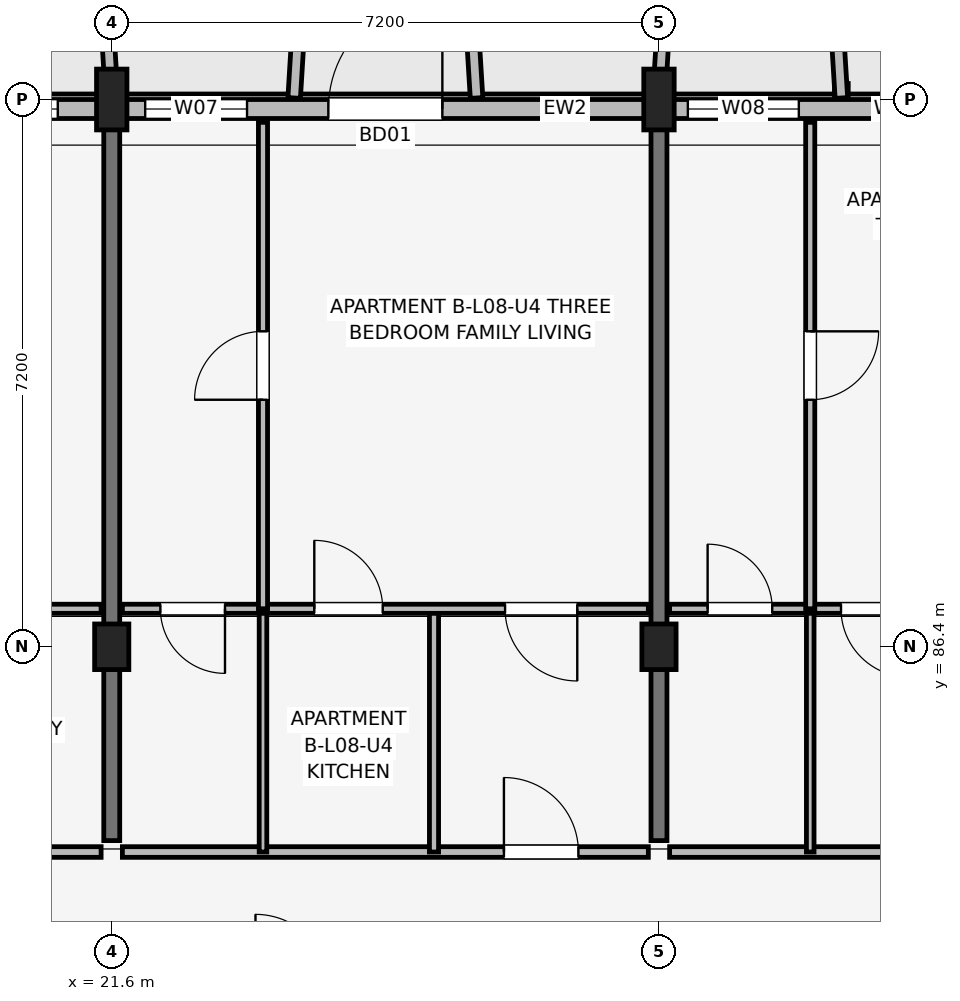
"""IFC4 building model, lengths in metres.
Left out: names, types, materials, properties, quantities, classifications, styles, units other than length and angle.
Written with IfcOpenShell. Run it as: python <this file> out.ifc"""

import sys

from ifc_helpers import new_model, si_unit, direction, frame, frame_2d, origin, origin_2d, place, context, subcontext, project, spatial, rectangle, extrude, element, fill, save


model = new_model("IFC4")
c1 = context("Model", 3, precision=1e-05, world=origin(), true_north=direction((0.0, 1.0)))
c2 = subcontext(c1, "Body", "Model", "MODEL_VIEW")
j1 = project(units=[si_unit("LENGTHUNIT", "METRE"), si_unit("PLANEANGLEUNIT", "RADIAN")], contexts=[c1])
p1 = place(None, origin())
s1 = spatial("IfcSite", under=j1, at=p1, CompositionType="ELEMENT")
p2 = place(p1, origin())
s2 = spatial("IfcBuilding", under=s1, at=p2, CompositionType="ELEMENT")
p3 = place(p2, frame((0.0, 0.0, 27.6)))
s3 = spatial("IfcBuildingStorey", under=s2, at=p3, CompositionType="ELEMENT", Elevation=27.6)
p4 = place(p3, frame((21.6, 86.4, 0.0), z_axis=(0.0, 0.0, 1.0), x_axis=(1.0, 0.0, 0.0)))
e1 = element("IfcColumn", 1, at=p4, inside=s3, PredefinedType="COLUMN", context=c2, shape_type="SweptSolid", body=[
    extrude(rectangle(XDim=0.45, YDim=0.6, at=origin_2d()), origin(), (0.0, 0.0, 1.0), 3.15),
])
p5 = place(p3, frame((21.6, 93.6, 0.0), z_axis=(0.0, 0.0, 1.0), x_axis=(1.0, 0.0, 0.0)))
e2 = element("IfcColumn", 2, at=p5, inside=s3, PredefinedType="COLUMN", context=c2, shape_type="SweptSolid", body=[
    extrude(rectangle(XDim=0.4, YDim=0.8, at=origin_2d()), origin(), (0.0, 0.0, 1.0), 3.15),
])
p6 = place(p3, frame((28.8, 86.4, 0.0), z_axis=(0.0, 0.0, 1.0), x_axis=(1.0, 0.0, 0.0)))
e3 = element("IfcColumn", 3, at=p6, inside=s3, PredefinedType="COLUMN", context=c2, shape_type="SweptSolid", body=[
    extrude(rectangle(XDim=0.45, YDim=0.6, at=origin_2d()), origin(), (0.0, 0.0, 1.0), 3.15),
])
p7 = place(p3, frame((28.8, 93.6, 0.0), z_axis=(0.0, 0.0, 1.0), x_axis=(1.0, 0.0, 0.0)))
e4 = element("IfcColumn", 4, at=p7, inside=s3, PredefinedType="COLUMN", context=c2, shape_type="SweptSolid", body=[
    extrude(rectangle(XDim=0.4, YDim=0.8, at=origin_2d()), origin(), (0.0, 0.0, 1.0), 3.15),
])
for number, where, z_axis, x_axis in (
    (5, (21.6, 83.85, 0.0), (0.0, 0.0, 1.0), (0.0, 1.0, 0.0)),
    (6, (28.8, 83.85, 0.0), (0.0, 0.0, 1.0), (0.0, 1.0, 0.0)),
):
    element("IfcWall", number, at=place(p3, frame(where, z_axis=z_axis, x_axis=x_axis)), inside=s3, PredefinedType="SHEAR", context=c2, shape_type="SweptSolid", body=[
        extrude(rectangle(XDim=9.4, YDim=0.21, at=frame_2d((4.7, 0.0))), origin(), (0.0, 0.0, 1.0), 3.15),
    ])
p8 = place(p3, frame((32.8, 93.475, 0.0), z_axis=(0.0, 0.0, 1.0), x_axis=(-1.0, 0.0, 0.0)))
e7 = element("IfcWall", 7, at=p8, inside=s3, PredefinedType="SOLIDWALL", context=c2, shape_type="SweptSolid", body=[
    extrude(rectangle(XDim=29.6, YDim=0.25, at=frame_2d((14.8, 0.0))), origin(), (0.0, 0.0, 1.0), 2.43),
])
p9 = place(p8, frame((22.825, 0.0, 0.0), z_axis=(0.0, 0.0, 1.0), x_axis=(-1.0, 0.0, 0.0)))
e8 = element("IfcOpeningElement", 8, at=p9, cuts=e7, PredefinedType="OPENING", context=c2, shape_type="SweptSolid", body=[
    extrude(rectangle(XDim=1.65, YDim=2.15, at=frame_2d((0.825, 1.075))), frame((0.0, 0.135, 0.0), z_axis=(0.0, -1.0, 0.0), x_axis=(1.0, 0.0, 0.0)), (0.0, 0.0, 1.0), 0.27),
])
p10 = place(p8, frame((8.35, 0.0, 0.0), z_axis=(0.0, 0.0, 1.0), x_axis=(-1.0, 0.0, 0.0)))
e9 = element("IfcOpeningElement", 9, at=p10, cuts=e7, PredefinedType="OPENING", context=c2, shape_type="SweptSolid", body=[
    extrude(rectangle(XDim=1.5, YDim=2.15, at=frame_2d((0.75, 1.075))), frame((0.0, 0.135, 0.0), z_axis=(0.0, -1.0, 0.0), x_axis=(1.0, 0.0, 0.0)), (0.0, 0.0, 1.0), 0.27),
])
p11 = place(p8, frame((25.99, 0.0, 0.7)))
e10 = element("IfcOpeningElement", 10, at=p11, cuts=e7, PredefinedType="OPENING", context=c2, shape_type="SweptSolid", body=[
    extrude(rectangle(XDim=1.86, YDim=1.6, at=frame_2d((0.93, 0.8))), frame((0.0, 0.135, 0.0), z_axis=(0.0, -1.0, 0.0), x_axis=(1.0, 0.0, 0.0)), (0.0, 0.0, 1.0), 0.27),
])
p12 = place(p8, frame((24.0, 0.0, 0.75)))
e11 = element("IfcOpeningElement", 11, at=p12, cuts=e7, PredefinedType="OPENING", context=c2, shape_type="SweptSolid", body=[
    extrude(rectangle(XDim=0.98, YDim=1.45, at=frame_2d((0.49, 0.725))), frame((0.0, 0.135, 0.0), z_axis=(0.0, -1.0, 0.0), x_axis=(1.0, 0.0, 0.0)), (0.0, 0.0, 1.0), 0.27),
])
p13 = place(p8, frame((16.15, 0.0, 0.7)))
e12 = element("IfcOpeningElement", 12, at=p13, cuts=e7, PredefinedType="OPENING", context=c2, shape_type="SweptSolid", body=[
    extrude(rectangle(XDim=1.86, YDim=1.6, at=frame_2d((0.93, 0.8))), frame((0.0, 0.135, 0.0), z_axis=(0.0, -1.0, 0.0), x_axis=(1.0, 0.0, 0.0)), (0.0, 0.0, 1.0), 0.27),
])
p14 = place(p8, frame((11.91, 0.0, 0.75)))
e13 = element("IfcOpeningElement", 13, at=p14, cuts=e7, PredefinedType="OPENING", context=c2, shape_type="SweptSolid", body=[
    extrude(rectangle(XDim=1.22, YDim=1.5, at=frame_2d((0.61, 0.75))), frame((0.0, 0.135, 0.0), z_axis=(0.0, -1.0, 0.0), x_axis=(1.0, 0.0, 0.0)), (0.0, 0.0, 1.0), 0.27),
])
p15 = place(p8, frame((9.42, 0.0, 0.75)))
e14 = element("IfcOpeningElement", 14, at=p15, cuts=e7, PredefinedType="OPENING", context=c2, shape_type="SweptSolid", body=[
    extrude(rectangle(XDim=1.34, YDim=1.55, at=frame_2d((0.67, 0.775))), frame((0.0, 0.135, 0.0), z_axis=(0.0, -1.0, 0.0), x_axis=(1.0, 0.0, 0.0)), (0.0, 0.0, 1.0), 0.27),
])
p16 = place(p8, frame((2.16, 0.0, 0.75)))
e15 = element("IfcOpeningElement", 15, at=p16, cuts=e7, PredefinedType="OPENING", context=c2, shape_type="SweptSolid", body=[
    extrude(rectangle(XDim=1.46, YDim=1.55, at=frame_2d((0.73, 0.775))), frame((0.0, 0.135, 0.0), z_axis=(0.0, -1.0, 0.0), x_axis=(1.0, 0.0, 0.0)), (0.0, 0.0, 1.0), 0.27),
])
p17 = place(p8, frame((0.585, 0.0, 0.75)))
e16 = element("IfcOpeningElement", 16, at=p17, cuts=e7, PredefinedType="OPENING", context=c2, shape_type="SweptSolid", body=[
    extrude(rectangle(XDim=0.6, YDim=1.25, at=frame_2d((0.3, 0.625))), frame((0.0, 0.135, 0.0), z_axis=(0.0, -1.0, 0.0), x_axis=(1.0, 0.0, 0.0)), (0.0, 0.0, 1.0), 0.27),
])
p18 = place(p3, frame((21.6, 93.62, 0.0), z_axis=(0.0, 0.0, 1.0), x_axis=(-0.061170732449, 0.998127317276, 0.0)))
e17 = element("IfcWall", 17, at=p18, inside=s3, PredefinedType="ELEMENTEDWALL", context=c2, shape_type="SweptSolid", body=[
    extrude(rectangle(XDim=1.964, YDim=0.165, at=frame_2d((0.982, 0.0))), origin(), (0.0, 0.0, 1.0), 2.58),
])
for number, where, z_axis, x_axis in (
    (18, (24.0, 93.62, 0.0), (0.0, 0.0, 1.0), (0.061, 0.998, 0.0)),
    (19, (26.4, 93.62, 0.0), (0.0, 0.0, 1.0), (-0.061, 0.998, 0.0)),
):
    element("IfcWall", number, at=place(p3, frame(where, z_axis=z_axis, x_axis=x_axis)), inside=s3, PredefinedType="ELEMENTEDWALL", context=c2, shape_type="SweptSolid", body=[
        extrude(rectangle(XDim=1.964, YDim=0.165, at=frame_2d((0.982, 0.0))), origin(), (0.0, 0.0, 1.0), 2.45),
    ])
for number, where, z_axis, x_axis in (
    (20, (28.8, 93.62, 0.0), (0.0, 0.0, 1.0), (0.061, 0.998, 0.0)),
    (21, (31.2, 93.62, 0.0), (0.0, 0.0, 1.0), (-0.061, 0.998, 0.0)),
):
    element("IfcWall", number, at=place(p3, frame(where, z_axis=z_axis, x_axis=x_axis)), inside=s3, PredefinedType="ELEMENTEDWALL", context=c2, shape_type="SweptSolid", body=[
        extrude(rectangle(XDim=1.964, YDim=0.165, at=frame_2d((0.982, 0.0))), origin(), (0.0, 0.0, 1.0), 2.95),
    ])
p19 = place(p3, frame((14.54, 83.7, 0.0), z_axis=(0.0, 0.0, 1.0), x_axis=(1.0, 0.0, 0.0)))
e22 = element("IfcWall", 22, at=p19, inside=s3, PredefinedType="PARTITIONING", context=c2, shape_type="SweptSolid", body=[
    extrude(rectangle(XDim=6.92, YDim=0.14, at=frame_2d((3.46, 0.0))), origin(), (0.0, 0.0, 1.0), 2.38),
])
p20 = place(p19, frame((5.85, 0.0, 0.0), z_axis=(0.0, 0.0, 1.0), x_axis=(-1.0, 0.0, 0.0)))
e23 = element("IfcOpeningElement", 23, at=p20, cuts=e22, PredefinedType="OPENING", context=c2, shape_type="SweptSolid", body=[
    extrude(rectangle(XDim=0.98, YDim=2.1, at=frame_2d((0.49, 1.05))), frame((0.0, 0.08, 0.0), z_axis=(0.0, -1.0, 0.0), x_axis=(1.0, 0.0, 0.0)), (0.0, 0.0, 1.0), 0.16),
])
p21 = place(p3, frame((14.54, 86.9, 0.0), z_axis=(0.0, 0.0, 1.0), x_axis=(1.0, 0.0, 0.0)))
e24 = element("IfcWall", 24, at=p21, inside=s3, PredefinedType="PARTITIONING", context=c2, shape_type="SweptSolid", body=[
    extrude(rectangle(XDim=6.92, YDim=0.12, at=frame_2d((3.46, 0.0))), origin(), (0.0, 0.0, 1.0), 2.38),
])
p22 = place(p21, frame((0.5, 0.0, 0.0)))
e25 = element("IfcOpeningElement", 25, at=p22, cuts=e24, PredefinedType="OPENING", context=c2, shape_type="SweptSolid", body=[
    extrude(rectangle(XDim=0.85, YDim=2.08, at=frame_2d((0.425, 1.04))), frame((0.0, 0.07, 0.0), z_axis=(0.0, -1.0, 0.0), x_axis=(1.0, 0.0, 0.0)), (0.0, 0.0, 1.0), 0.14),
])
p23 = place(p21, frame((3.275, 0.0, 0.0), z_axis=(0.0, 0.0, 1.0), x_axis=(-1.0, 0.0, 0.0)))
e26 = element("IfcOpeningElement", 26, at=p23, cuts=e24, PredefinedType="OPENING", context=c2, shape_type="SweptSolid", body=[
    extrude(rectangle(XDim=0.9, YDim=2.08, at=frame_2d((0.45, 1.04))), frame((0.0, 0.07, 0.0), z_axis=(0.0, -1.0, 0.0), x_axis=(1.0, 0.0, 0.0)), (0.0, 0.0, 1.0), 0.14),
])
p24 = place(p21, frame((4.885, 0.0, 0.0)))
e27 = element("IfcOpeningElement", 27, at=p24, cuts=e24, PredefinedType="OPENING", context=c2, shape_type="SweptSolid", body=[
    extrude(rectangle(XDim=0.95, YDim=2.08, at=frame_2d((0.475, 1.04))), frame((0.0, 0.07, 0.0), z_axis=(0.0, -1.0, 0.0), x_axis=(1.0, 0.0, 0.0)), (0.0, 0.0, 1.0), 0.14),
])
p25 = place(p3, frame((21.74, 83.7, 0.0), z_axis=(0.0, 0.0, 1.0), x_axis=(1.0, 0.0, 0.0)))
e28 = element("IfcWall", 28, at=p25, inside=s3, PredefinedType="PARTITIONING", context=c2, shape_type="SweptSolid", body=[
    extrude(rectangle(XDim=6.92, YDim=0.14, at=frame_2d((3.46, 0.0))), origin(), (0.0, 0.0, 1.0), 2.38),
])
p26 = place(p25, frame((5.02, 0.0, 0.0)))
e29 = element("IfcOpeningElement", 29, at=p26, cuts=e28, PredefinedType="OPENING", context=c2, shape_type="SweptSolid", body=[
    extrude(rectangle(XDim=0.98, YDim=2.1, at=frame_2d((0.49, 1.05))), frame((0.0, 0.08, 0.0), z_axis=(0.0, -1.0, 0.0), x_axis=(1.0, 0.0, 0.0)), (0.0, 0.0, 1.0), 0.16),
])
p27 = place(p3, frame((23.59, 83.7, 0.0), z_axis=(0.0, 0.0, 1.0), x_axis=(0.0, 1.0, 0.0)))
e30 = element("IfcWall", 30, at=p27, inside=s3, PredefinedType="PARTITIONING", context=c2, shape_type="SweptSolid", body=[
    extrude(rectangle(XDim=3.2, YDim=0.1, at=frame_2d((1.6, 0.0))), origin(), (0.0, 0.0, 1.0), 2.38),
])
p28 = place(p3, frame((25.84, 83.7, 0.0), z_axis=(0.0, 0.0, 1.0), x_axis=(0.0, 1.0, 0.0)))
e31 = element("IfcWall", 31, at=p28, inside=s3, PredefinedType="PARTITIONING", context=c2, shape_type="SweptSolid", body=[
    extrude(rectangle(XDim=3.2, YDim=0.12, at=frame_2d((1.6, 0.0))), origin(), (0.0, 0.0, 1.0), 2.38),
])
p29 = place(p3, frame((21.74, 86.9, 0.0), z_axis=(0.0, 0.0, 1.0), x_axis=(1.0, 0.0, 0.0)))
e32 = element("IfcWall", 32, at=p29, inside=s3, PredefinedType="PARTITIONING", context=c2, shape_type="SweptSolid", body=[
    extrude(rectangle(XDim=6.92, YDim=0.12, at=frame_2d((3.46, 0.0))), origin(), (0.0, 0.0, 1.0), 2.38),
])
p30 = place(p29, frame((1.35, 0.0, 0.0), z_axis=(0.0, 0.0, 1.0), x_axis=(-1.0, 0.0, 0.0)))
e33 = element("IfcOpeningElement", 33, at=p30, cuts=e32, PredefinedType="OPENING", context=c2, shape_type="SweptSolid", body=[
    extrude(rectangle(XDim=0.85, YDim=2.08, at=frame_2d((0.425, 1.04))), frame((0.0, 0.07, 0.0), z_axis=(0.0, -1.0, 0.0), x_axis=(1.0, 0.0, 0.0)), (0.0, 0.0, 1.0), 0.14),
])
p31 = place(p29, frame((2.525, 0.0, 0.0)))
e34 = element("IfcOpeningElement", 34, at=p31, cuts=e32, PredefinedType="OPENING", context=c2, shape_type="SweptSolid", body=[
    extrude(rectangle(XDim=0.9, YDim=2.08, at=frame_2d((0.45, 1.04))), frame((0.0, 0.07, 0.0), z_axis=(0.0, -1.0, 0.0), x_axis=(1.0, 0.0, 0.0)), (0.0, 0.0, 1.0), 0.14),
])
p32 = place(p29, frame((5.985, 0.0, 0.0), z_axis=(0.0, 0.0, 1.0), x_axis=(-1.0, 0.0, 0.0)))
e35 = element("IfcOpeningElement", 35, at=p32, cuts=e32, PredefinedType="OPENING", context=c2, shape_type="SweptSolid", body=[
    extrude(rectangle(XDim=0.95, YDim=2.08, at=frame_2d((0.475, 1.04))), frame((0.0, 0.07, 0.0), z_axis=(0.0, -1.0, 0.0), x_axis=(1.0, 0.0, 0.0)), (0.0, 0.0, 1.0), 0.14),
])
p33 = place(p3, frame((23.59, 86.9, 0.0), z_axis=(0.0, 0.0, 1.0), x_axis=(0.0, 1.0, 0.0)))
e36 = element("IfcWall", 36, at=p33, inside=s3, PredefinedType="PARTITIONING", context=c2, shape_type="SweptSolid", body=[
    extrude(rectangle(XDim=6.4, YDim=0.12, at=frame_2d((3.2, 0.0))), origin(), (0.0, 0.0, 1.0), 2.38),
])
p34 = place(p33, frame((2.75, 0.0, 0.0)))
e37 = element("IfcOpeningElement", 37, at=p34, cuts=e36, PredefinedType="OPENING", context=c2, shape_type="SweptSolid", body=[
    extrude(rectangle(XDim=0.9, YDim=2.08, at=frame_2d((0.45, 1.04))), frame((0.0, 0.07, 0.0), z_axis=(0.0, -1.0, 0.0), x_axis=(1.0, 0.0, 0.0)), (0.0, 0.0, 1.0), 0.14),
])
p35 = place(p3, frame((28.94, 83.7, 0.0), z_axis=(0.0, 0.0, 1.0), x_axis=(1.0, 0.0, 0.0)))
e38 = element("IfcWall", 38, at=p35, inside=s3, PredefinedType="PARTITIONING", context=c2, shape_type="SweptSolid", body=[
    extrude(rectangle(XDim=6.92, YDim=0.14, at=frame_2d((3.46, 0.0))), origin(), (0.0, 0.0, 1.0), 2.38),
])
p36 = place(p35, frame((4.875, 0.0, 0.0), z_axis=(0.0, 0.0, 1.0), x_axis=(-1.0, 0.0, 0.0)))
e39 = element("IfcOpeningElement", 39, at=p36, cuts=e38, PredefinedType="OPENING", context=c2, shape_type="SweptSolid", body=[
    extrude(rectangle(XDim=0.98, YDim=2.1, at=frame_2d((0.49, 1.05))), frame((0.0, 0.08, 0.0), z_axis=(0.0, -1.0, 0.0), x_axis=(1.0, 0.0, 0.0)), (0.0, 0.0, 1.0), 0.16),
])
p37 = place(p3, frame((30.79, 83.7, 0.0), z_axis=(0.0, 0.0, 1.0), x_axis=(0.0, 1.0, 0.0)))
e40 = element("IfcWall", 40, at=p37, inside=s3, PredefinedType="PARTITIONING", context=c2, shape_type="SweptSolid", body=[
    extrude(rectangle(XDim=3.2, YDim=0.1, at=frame_2d((1.6, 0.0))), origin(), (0.0, 0.0, 1.0), 2.38),
])
p38 = place(p3, frame((28.94, 86.9, 0.0), z_axis=(0.0, 0.0, 1.0), x_axis=(1.0, 0.0, 0.0)))
e41 = element("IfcWall", 41, at=p38, inside=s3, PredefinedType="PARTITIONING", context=c2, shape_type="SweptSolid", body=[
    extrude(rectangle(XDim=6.92, YDim=0.12, at=frame_2d((3.46, 0.0))), origin(), (0.0, 0.0, 1.0), 2.38),
])
p39 = place(p38, frame((0.5, 0.0, 0.0)))
e42 = element("IfcOpeningElement", 42, at=p39, cuts=e41, PredefinedType="OPENING", context=c2, shape_type="SweptSolid", body=[
    extrude(rectangle(XDim=0.85, YDim=2.08, at=frame_2d((0.425, 1.04))), frame((0.0, 0.07, 0.0), z_axis=(0.0, -1.0, 0.0), x_axis=(1.0, 0.0, 0.0)), (0.0, 0.0, 1.0), 0.14),
])
p40 = place(p38, frame((3.155, 0.0, 0.0), z_axis=(0.0, 0.0, 1.0), x_axis=(-1.0, 0.0, 0.0)))
e43 = element("IfcOpeningElement", 43, at=p40, cuts=e41, PredefinedType="OPENING", context=c2, shape_type="SweptSolid", body=[
    extrude(rectangle(XDim=0.9, YDim=2.08, at=frame_2d((0.45, 1.04))), frame((0.0, 0.07, 0.0), z_axis=(0.0, -1.0, 0.0), x_axis=(1.0, 0.0, 0.0)), (0.0, 0.0, 1.0), 0.14),
])
p41 = place(p38, frame((3.91, 0.0, 0.0)))
e44 = element("IfcOpeningElement", 44, at=p41, cuts=e41, PredefinedType="OPENING", context=c2, shape_type="SweptSolid", body=[
    extrude(rectangle(XDim=0.95, YDim=2.08, at=frame_2d((0.475, 1.04))), frame((0.0, 0.07, 0.0), z_axis=(0.0, -1.0, 0.0), x_axis=(1.0, 0.0, 0.0)), (0.0, 0.0, 1.0), 0.14),
])
p42 = place(p3, frame((30.79, 86.9, 0.0), z_axis=(0.0, 0.0, 1.0), x_axis=(0.0, 1.0, 0.0)))
e45 = element("IfcWall", 45, at=p42, inside=s3, PredefinedType="PARTITIONING", context=c2, shape_type="SweptSolid", body=[
    extrude(rectangle(XDim=6.4, YDim=0.12, at=frame_2d((3.2, 0.0))), origin(), (0.0, 0.0, 1.0), 2.38),
])
p43 = place(p42, frame((3.65, 0.0, 0.0), z_axis=(0.0, 0.0, 1.0), x_axis=(-1.0, 0.0, 0.0)))
e46 = element("IfcOpeningElement", 46, at=p43, cuts=e45, PredefinedType="OPENING", context=c2, shape_type="SweptSolid", body=[
    extrude(rectangle(XDim=0.9, YDim=2.08, at=frame_2d((0.45, 1.04))), frame((0.0, 0.07, 0.0), z_axis=(0.0, -1.0, 0.0), x_axis=(1.0, 0.0, 0.0)), (0.0, 0.0, 1.0), 0.14),
])
p44 = place(p10, origin())
e47 = element("IfcDoor", 47, at=p44, inside=s3, OperationType="SINGLE_SWING_LEFT", PredefinedType="DOOR", context=c2, shape_type="SweptSolid", body=[
    extrude(rectangle(XDim=1.5, YDim=2.15, at=frame_2d((0.75, 1.075))), frame((0.0, 0.025, 0.0), z_axis=(0.0, -1.0, 0.0), x_axis=(1.0, 0.0, 0.0)), (0.0, 0.0, 1.0), 0.05),
])
fill(e9, e47)
p45 = place(p14, origin())
e48 = element("IfcWindow", 48, at=p45, inside=s3, PartitioningType="SINGLE_PANEL", PredefinedType="WINDOW", context=c2, shape_type="SweptSolid", body=[
    extrude(rectangle(XDim=1.22, YDim=1.5, at=frame_2d((0.61, 0.75))), frame((0.0, 0.03, 0.0), z_axis=(0.0, -1.0, 0.0), x_axis=(1.0, 0.0, 0.0)), (0.0, 0.0, 1.0), 0.06),
])
fill(e13, e48)
p46 = place(p15, origin())
e49 = element("IfcWindow", 49, at=p46, inside=s3, PartitioningType="SINGLE_PANEL", PredefinedType="WINDOW", context=c2, shape_type="SweptSolid", body=[
    extrude(rectangle(XDim=1.34, YDim=1.55, at=frame_2d((0.67, 0.775))), frame((0.0, 0.03, 0.0), z_axis=(0.0, -1.0, 0.0), x_axis=(1.0, 0.0, 0.0)), (0.0, 0.0, 1.0), 0.06),
])
fill(e14, e49)
p47 = place(p16, origin())
e50 = element("IfcWindow", 50, at=p47, inside=s3, PartitioningType="SINGLE_PANEL", PredefinedType="WINDOW", context=c2, shape_type="SweptSolid", body=[
    extrude(rectangle(XDim=1.46, YDim=1.55, at=frame_2d((0.73, 0.775))), frame((0.0, 0.03, 0.0), z_axis=(0.0, -1.0, 0.0), x_axis=(1.0, 0.0, 0.0)), (0.0, 0.0, 1.0), 0.06),
])
fill(e15, e50)
p48 = place(p17, origin())
e51 = element("IfcWindow", 51, at=p48, inside=s3, PartitioningType="SINGLE_PANEL", PredefinedType="WINDOW", context=c2, shape_type="SweptSolid", body=[
    extrude(rectangle(XDim=0.6, YDim=1.25, at=frame_2d((0.3, 0.625))), frame((0.0, 0.03, 0.0), z_axis=(0.0, -1.0, 0.0), x_axis=(1.0, 0.0, 0.0)), (0.0, 0.0, 1.0), 0.06),
])
fill(e16, e51)
p49 = place(p26, origin())
e52 = element("IfcDoor", 52, at=p49, inside=s3, OperationType="SINGLE_SWING_LEFT", PredefinedType="DOOR", context=c2, shape_type="SweptSolid", body=[
    extrude(rectangle(XDim=0.98, YDim=2.1, at=frame_2d((0.49, 1.05))), frame((0.0, 0.025, 0.0), z_axis=(0.0, -1.0, 0.0), x_axis=(1.0, 0.0, 0.0)), (0.0, 0.0, 1.0), 0.05),
])
fill(e29, e52)
p50 = place(p30, origin())
e53 = element("IfcDoor", 53, at=p50, inside=s3, OperationType="SINGLE_SWING_RIGHT", PredefinedType="DOOR", context=c2, shape_type="SweptSolid", body=[
    extrude(rectangle(XDim=0.85, YDim=2.08, at=frame_2d((0.425, 1.04))), frame((0.0, 0.025, 0.0), z_axis=(0.0, -1.0, 0.0), x_axis=(1.0, 0.0, 0.0)), (0.0, 0.0, 1.0), 0.05),
])
fill(e33, e53)
p51 = place(p31, origin())
e54 = element("IfcDoor", 54, at=p51, inside=s3, OperationType="SINGLE_SWING_LEFT", PredefinedType="DOOR", context=c2, shape_type="SweptSolid", body=[
    extrude(rectangle(XDim=0.9, YDim=2.08, at=frame_2d((0.45, 1.04))), frame((0.0, 0.025, 0.0), z_axis=(0.0, -1.0, 0.0), x_axis=(1.0, 0.0, 0.0)), (0.0, 0.0, 1.0), 0.05),
])
fill(e34, e54)
p52 = place(p32, origin())
e55 = element("IfcDoor", 55, at=p52, inside=s3, OperationType="SINGLE_SWING_RIGHT", PredefinedType="DOOR", context=c2, shape_type="SweptSolid", body=[
    extrude(rectangle(XDim=0.95, YDim=2.08, at=frame_2d((0.475, 1.04))), frame((0.0, 0.025, 0.0), z_axis=(0.0, -1.0, 0.0), x_axis=(1.0, 0.0, 0.0)), (0.0, 0.0, 1.0), 0.05),
])
fill(e35, e55)
p53 = place(p34, origin())
e56 = element("IfcDoor", 56, at=p53, inside=s3, OperationType="SINGLE_SWING_LEFT", PredefinedType="DOOR", context=c2, shape_type="SweptSolid", body=[
    extrude(rectangle(XDim=0.9, YDim=2.08, at=frame_2d((0.45, 1.04))), frame((0.0, 0.025, 0.0), z_axis=(0.0, -1.0, 0.0), x_axis=(1.0, 0.0, 0.0)), (0.0, 0.0, 1.0), 0.05),
])
fill(e37, e56)
p54 = place(p39, origin())
e57 = element("IfcDoor", 57, at=p54, inside=s3, OperationType="SINGLE_SWING_LEFT", PredefinedType="DOOR", context=c2, shape_type="SweptSolid", body=[
    extrude(rectangle(XDim=0.85, YDim=2.08, at=frame_2d((0.425, 1.04))), frame((0.0, 0.025, 0.0), z_axis=(0.0, -1.0, 0.0), x_axis=(1.0, 0.0, 0.0)), (0.0, 0.0, 1.0), 0.05),
])
fill(e42, e57)
p55 = place(p40, origin())
e58 = element("IfcDoor", 58, at=p55, inside=s3, OperationType="SINGLE_SWING_RIGHT", PredefinedType="DOOR", context=c2, shape_type="SweptSolid", body=[
    extrude(rectangle(XDim=0.9, YDim=2.08, at=frame_2d((0.45, 1.04))), frame((0.0, 0.025, 0.0), z_axis=(0.0, -1.0, 0.0), x_axis=(1.0, 0.0, 0.0)), (0.0, 0.0, 1.0), 0.05),
])
fill(e43, e58)
p56 = place(p43, origin())
e59 = element("IfcDoor", 59, at=p56, inside=s3, OperationType="SINGLE_SWING_RIGHT", PredefinedType="DOOR", context=c2, shape_type="SweptSolid", body=[
    extrude(rectangle(XDim=0.9, YDim=2.08, at=frame_2d((0.45, 1.04))), frame((0.0, 0.025, 0.0), z_axis=(0.0, -1.0, 0.0), x_axis=(1.0, 0.0, 0.0)), (0.0, 0.0, 1.0), 0.05),
])
fill(e46, e59)
save(model, sys.argv[1])
